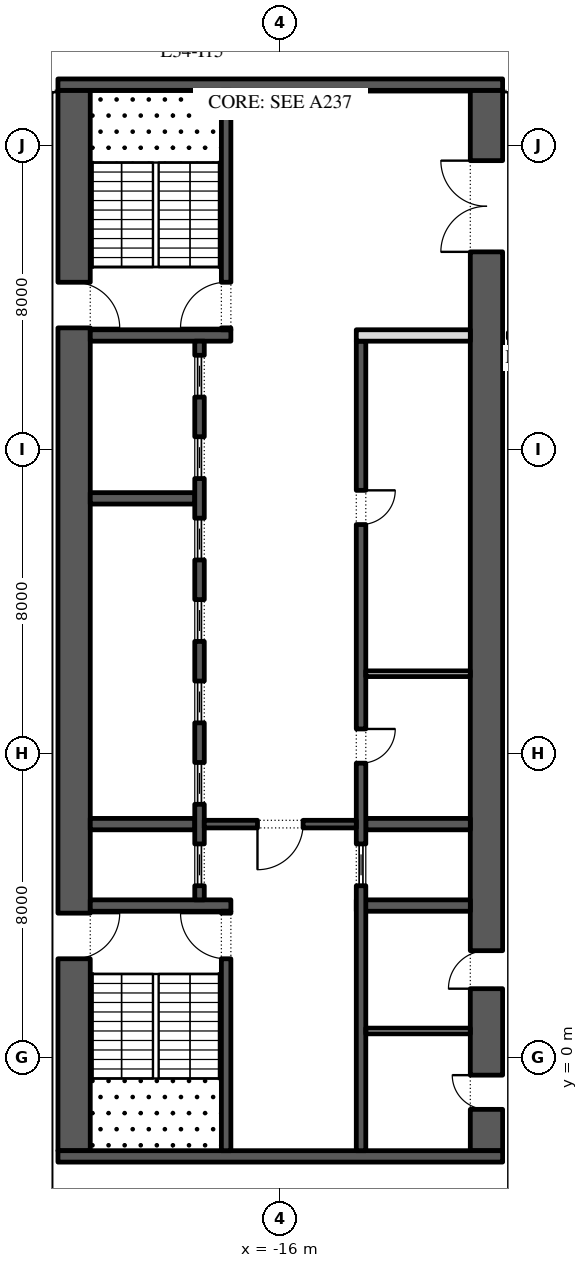
"""IFC4 building model, lengths in metres.
Left out: names, types, materials, properties, quantities, classifications, styles, units other than length and angle.
Written with IfcOpenShell. Run it as: python <this file> out.ifc"""

import sys

from ifc_helpers import new_model, si_unit, direction, frame, frame_2d, origin, place, context, subcontext, project, spatial, rectangle, extrude, element, fill, save


model = new_model("IFC4")
c1 = context("Model", 3, precision=1e-05, world=origin(), true_north=direction((0.0, 1.0)))
c2 = subcontext(c1, "Body", "Model", "MODEL_VIEW")
j1 = project(units=[si_unit("LENGTHUNIT", "METRE"), si_unit("PLANEANGLEUNIT", "RADIAN")], contexts=[c1])
p1 = place(None, origin())
s1 = spatial("IfcSite", under=j1, at=p1, CompositionType="ELEMENT")
p2 = place(p1, origin())
s2 = spatial("IfcBuilding", under=s1, at=p2, CompositionType="ELEMENT")
p3 = place(p2, frame((0.0, 0.0, 156.0)))
s3 = spatial("IfcBuildingStorey", under=s2, at=p3, CompositionType="ELEMENT", Elevation=156.0)
p4 = place(p3, frame((-21.425, -2.45, 0.0), z_axis=(0.0, 0.0, 1.0), x_axis=(0.0, 1.0, 0.0)))
e1 = element("IfcWall", 1, at=p4, inside=s3, PredefinedType="SHEAR", context=c2, shape_type="SweptSolid", body=[
    extrude(rectangle(XDim=27.9, YDim=0.85, at=frame_2d((13.95, 0.0))), origin(), (0.0, 0.0, 1.0), 3.9),
])
p5 = place(p4, frame((5.05, 0.0, 0.0)))
e2 = element("IfcOpeningElement", 2, at=p5, cuts=e1, PredefinedType="OPENING", context=c2, shape_type="SweptSolid", body=[
    extrude(rectangle(XDim=1.2, YDim=2.1, at=frame_2d((0.6, 1.05))), frame((0.0, 0.435, 0.0), z_axis=(0.0, -1.0, 0.0), x_axis=(1.0, 0.0, 0.0)), (0.0, 0.0, 1.0), 0.87),
])
p6 = place(p4, frame((21.65, 0.0, 0.0)))
e3 = element("IfcOpeningElement", 3, at=p6, cuts=e1, PredefinedType="OPENING", context=c2, shape_type="SweptSolid", body=[
    extrude(rectangle(XDim=1.2, YDim=2.1, at=frame_2d((0.6, 1.05))), frame((0.0, 0.435, 0.0), z_axis=(0.0, -1.0, 0.0), x_axis=(1.0, 0.0, 0.0)), (0.0, 0.0, 1.0), 0.87),
])
p7 = place(p3, frame((-10.575, -2.45, 0.0), z_axis=(0.0, 0.0, 1.0), x_axis=(0.0, 1.0, 0.0)))
e4 = element("IfcWall", 4, at=p7, inside=s3, PredefinedType="SHEAR", context=c2, shape_type="SweptSolid", body=[
    extrude(rectangle(XDim=27.9, YDim=0.85, at=frame_2d((13.95, 0.0))), origin(), (0.0, 0.0, 1.0), 3.9),
])
p8 = place(p7, frame((23.65, 0.0, 0.0)))
e5 = element("IfcOpeningElement", 5, at=p8, cuts=e4, PredefinedType="OPENING", context=c2, shape_type="SweptSolid", body=[
    extrude(rectangle(XDim=2.4, YDim=2.1, at=frame_2d((1.2, 1.05))), frame((0.0, 0.435, 0.0), z_axis=(0.0, -1.0, 0.0), x_axis=(1.0, 0.0, 0.0)), (0.0, 0.0, 1.0), 0.87),
])
p9 = place(p7, frame((1.087, 0.0, 0.0)))
e6 = element("IfcOpeningElement", 6, at=p9, cuts=e4, PredefinedType="OPENING", context=c2, shape_type="SweptSolid", body=[
    extrude(rectangle(XDim=0.9, YDim=2.1, at=frame_2d((0.45, 1.05))), frame((0.0, 0.435, 0.0), z_axis=(0.0, -1.0, 0.0), x_axis=(1.0, 0.0, 0.0)), (0.0, 0.0, 1.0), 0.87),
])
p10 = place(p7, frame((4.262, 0.0, 0.0)))
e7 = element("IfcOpeningElement", 7, at=p10, cuts=e4, PredefinedType="OPENING", context=c2, shape_type="SweptSolid", body=[
    extrude(rectangle(XDim=1.0, YDim=2.1, at=frame_2d((0.5, 1.05))), frame((0.0, 0.435, 0.0), z_axis=(0.0, -1.0, 0.0), x_axis=(1.0, 0.0, 0.0)), (0.0, 0.0, 1.0), 0.87),
])
for number, where, z_axis, x_axis in (
    (8, (-21.85, -2.6, 0.0), (0.0, 0.0, 1.0), (1.0, 0.0, 0.0)),
    (9, (-21.85, 25.6, 0.0), (0.0, 0.0, 1.0), (1.0, 0.0, 0.0)),
):
    element("IfcWall", number, at=place(p3, frame(where, z_axis=z_axis, x_axis=x_axis)), inside=s3, PredefinedType="SHEAR", context=c2, shape_type="SweptSolid", body=[
        extrude(rectangle(XDim=11.7, YDim=0.3, at=frame_2d((5.85, 0.0))), origin(), (0.0, 0.0, 1.0), 3.9),
    ])
p11 = place(p3, frame((-21.0, 4.0, 0.0), z_axis=(0.0, 0.0, 1.0), x_axis=(1.0, 0.0, 0.0)))
e10 = element("IfcWall", 10, at=p11, inside=s3, PredefinedType="SHEAR", context=c2, shape_type="SweptSolid", body=[
    extrude(rectangle(XDim=3.7, YDim=0.3, at=frame_2d((1.85, 0.0))), origin(), (0.0, 0.0, 1.0), 3.9),
])
p12 = place(p3, frame((-17.425, -2.45, 0.0), z_axis=(0.0, 0.0, 1.0), x_axis=(0.0, 1.0, 0.0)))
e11 = element("IfcWall", 11, at=p12, inside=s3, PredefinedType="SHEAR", context=c2, shape_type="SweptSolid", body=[
    extrude(rectangle(XDim=6.3, YDim=0.25, at=frame_2d((3.15, 0.0))), origin(), (0.0, 0.0, 1.0), 3.9),
])
p13 = place(p12, frame((5.05, 0.0, 0.0)))
e12 = element("IfcOpeningElement", 12, at=p13, cuts=e11, PredefinedType="OPENING", context=c2, shape_type="SweptSolid", body=[
    extrude(rectangle(XDim=1.2, YDim=2.1, at=frame_2d((0.6, 1.05))), frame((0.0, 0.135, 0.0), z_axis=(0.0, -1.0, 0.0), x_axis=(1.0, 0.0, 0.0)), (0.0, 0.0, 1.0), 0.27),
])
p14 = place(p3, frame((-21.0, 19.0, 0.0), z_axis=(0.0, 0.0, 1.0), x_axis=(1.0, 0.0, 0.0)))
e13 = element("IfcWall", 13, at=p14, inside=s3, PredefinedType="SHEAR", context=c2, shape_type="SweptSolid", body=[
    extrude(rectangle(XDim=3.7, YDim=0.3, at=frame_2d((1.85, 0.0))), origin(), (0.0, 0.0, 1.0), 3.9),
])
p15 = place(p3, frame((-17.425, 19.15, 0.0), z_axis=(0.0, 0.0, 1.0), x_axis=(0.0, 1.0, 0.0)))
e14 = element("IfcWall", 14, at=p15, inside=s3, PredefinedType="SHEAR", context=c2, shape_type="SweptSolid", body=[
    extrude(rectangle(XDim=6.3, YDim=0.25, at=frame_2d((3.15, 0.0))), origin(), (0.0, 0.0, 1.0), 3.9),
])
p16 = place(p15, frame((0.05, 0.0, 0.0)))
e15 = element("IfcOpeningElement", 15, at=p16, cuts=e14, PredefinedType="OPENING", context=c2, shape_type="SweptSolid", body=[
    extrude(rectangle(XDim=1.2, YDim=2.1, at=frame_2d((0.6, 1.05))), frame((0.0, 0.135, 0.0), z_axis=(0.0, -1.0, 0.0), x_axis=(1.0, 0.0, 0.0)), (0.0, 0.0, 1.0), 0.27),
])
for number, where, z_axis, x_axis in (
    (16, (-21.0, 6.143, 0.0), (0.0, 0.0, 1.0), (1.0, 0.0, 0.0)),
    (17, (-21.0, 14.714, 0.0), (0.0, 0.0, 1.0), (1.0, 0.0, 0.0)),
):
    element("IfcWall", number, at=place(p3, frame(where, z_axis=z_axis, x_axis=x_axis)), inside=s3, PredefinedType="SHEAR", context=c2, shape_type="SweptSolid", body=[
        extrude(rectangle(XDim=2.75, YDim=0.3, at=frame_2d((1.375, 0.0))), origin(), (0.0, 0.0, 1.0), 3.9),
    ])
p17 = place(p3, frame((-18.125, 4.15, 0.0), z_axis=(0.0, 0.0, 1.0), x_axis=(0.0, 1.0, 0.0)))
e18 = element("IfcWall", 18, at=p17, inside=s3, PredefinedType="SHEAR", context=c2, shape_type="SweptSolid", body=[
    extrude(rectangle(XDim=14.7, YDim=0.25, at=frame_2d((7.35, 0.0))), origin(), (0.0, 0.0, 1.0), 3.9),
])
p18 = place(p17, frame((0.371, 0.0, 0.0)))
e19 = element("IfcOpeningElement", 19, at=p18, cuts=e18, PredefinedType="OPENING", context=c2, shape_type="SweptSolid", body=[
    extrude(rectangle(XDim=1.1, YDim=2.1, at=frame_2d((0.55, 1.05))), frame((0.0, 0.135, 0.0), z_axis=(0.0, -1.0, 0.0), x_axis=(1.0, 0.0, 0.0)), (0.0, 0.0, 1.0), 0.27),
])
p19 = place(p17, frame((2.514, 0.0, 0.0)))
e20 = element("IfcOpeningElement", 20, at=p19, cuts=e18, PredefinedType="OPENING", context=c2, shape_type="SweptSolid", body=[
    extrude(rectangle(XDim=1.1, YDim=2.1, at=frame_2d((0.55, 1.05))), frame((0.0, 0.135, 0.0), z_axis=(0.0, -1.0, 0.0), x_axis=(1.0, 0.0, 0.0)), (0.0, 0.0, 1.0), 0.27),
])
p20 = place(p17, frame((4.657, 0.0, 0.0)))
e21 = element("IfcOpeningElement", 21, at=p20, cuts=e18, PredefinedType="OPENING", context=c2, shape_type="SweptSolid", body=[
    extrude(rectangle(XDim=1.1, YDim=2.1, at=frame_2d((0.55, 1.05))), frame((0.0, 0.135, 0.0), z_axis=(0.0, -1.0, 0.0), x_axis=(1.0, 0.0, 0.0)), (0.0, 0.0, 1.0), 0.27),
])
p21 = place(p17, frame((6.8, 0.0, 0.0)))
e22 = element("IfcOpeningElement", 22, at=p21, cuts=e18, PredefinedType="OPENING", context=c2, shape_type="SweptSolid", body=[
    extrude(rectangle(XDim=1.1, YDim=2.1, at=frame_2d((0.55, 1.05))), frame((0.0, 0.135, 0.0), z_axis=(0.0, -1.0, 0.0), x_axis=(1.0, 0.0, 0.0)), (0.0, 0.0, 1.0), 0.27),
])
p22 = place(p17, frame((8.943, 0.0, 0.0)))
e23 = element("IfcOpeningElement", 23, at=p22, cuts=e18, PredefinedType="OPENING", context=c2, shape_type="SweptSolid", body=[
    extrude(rectangle(XDim=1.1, YDim=2.1, at=frame_2d((0.55, 1.05))), frame((0.0, 0.135, 0.0), z_axis=(0.0, -1.0, 0.0), x_axis=(1.0, 0.0, 0.0)), (0.0, 0.0, 1.0), 0.27),
])
p23 = place(p17, frame((11.086, 0.0, 0.0)))
e24 = element("IfcOpeningElement", 24, at=p23, cuts=e18, PredefinedType="OPENING", context=c2, shape_type="SweptSolid", body=[
    extrude(rectangle(XDim=1.1, YDim=2.1, at=frame_2d((0.55, 1.05))), frame((0.0, 0.135, 0.0), z_axis=(0.0, -1.0, 0.0), x_axis=(1.0, 0.0, 0.0)), (0.0, 0.0, 1.0), 0.27),
])
p24 = place(p17, frame((13.229, 0.0, 0.0)))
e25 = element("IfcOpeningElement", 25, at=p24, cuts=e18, PredefinedType="OPENING", context=c2, shape_type="SweptSolid", body=[
    extrude(rectangle(XDim=1.1, YDim=2.1, at=frame_2d((0.55, 1.05))), frame((0.0, 0.135, 0.0), z_axis=(0.0, -1.0, 0.0), x_axis=(1.0, 0.0, 0.0)), (0.0, 0.0, 1.0), 0.27),
])
p25 = place(p3, frame((-14.0, 4.0, 0.0), z_axis=(0.0, 0.0, 1.0), x_axis=(1.0, 0.0, 0.0)))
e26 = element("IfcWall", 26, at=p25, inside=s3, PredefinedType="SHEAR", context=c2, shape_type="SweptSolid", body=[
    extrude(rectangle(XDim=3.0, YDim=0.3, at=frame_2d((1.5, 0.0))), origin(), (0.0, 0.0, 1.0), 3.9),
])
p26 = place(p3, frame((-13.75, 6.143, 0.0), z_axis=(0.0, 0.0, 1.0), x_axis=(1.0, 0.0, 0.0)))
e27 = element("IfcWall", 27, at=p26, inside=s3, PredefinedType="SHEAR", context=c2, shape_type="SweptSolid", body=[
    extrude(rectangle(XDim=2.75, YDim=0.3, at=frame_2d((1.375, 0.0))), origin(), (0.0, 0.0, 1.0), 3.9),
])
p27 = place(p3, frame((-13.875, -2.45, 0.0), z_axis=(0.0, 0.0, 1.0), x_axis=(0.0, 1.0, 0.0)))
e28 = element("IfcWall", 28, at=p27, inside=s3, PredefinedType="SHEAR", context=c2, shape_type="SweptSolid", body=[
    extrude(rectangle(XDim=21.3, YDim=0.25, at=frame_2d((10.65, 0.0))), origin(), (0.0, 0.0, 1.0), 3.9),
])
p28 = place(p27, frame((10.196, 0.0, 0.0)))
e29 = element("IfcOpeningElement", 29, at=p28, cuts=e28, PredefinedType="OPENING", context=c2, shape_type="SweptSolid", body=[
    extrude(rectangle(XDim=0.9, YDim=2.1, at=frame_2d((0.45, 1.05))), frame((0.0, 0.135, 0.0), z_axis=(0.0, -1.0, 0.0), x_axis=(1.0, 0.0, 0.0)), (0.0, 0.0, 1.0), 0.27),
])
p29 = place(p27, frame((16.475, 0.0, 0.0)))
e30 = element("IfcOpeningElement", 30, at=p29, cuts=e28, PredefinedType="OPENING", context=c2, shape_type="SweptSolid", body=[
    extrude(rectangle(XDim=0.9, YDim=2.1, at=frame_2d((0.45, 1.05))), frame((0.0, 0.135, 0.0), z_axis=(0.0, -1.0, 0.0), x_axis=(1.0, 0.0, 0.0)), (0.0, 0.0, 1.0), 0.27),
])
p30 = place(p27, frame((6.971, 0.0, 0.0)))
e31 = element("IfcOpeningElement", 31, at=p30, cuts=e28, PredefinedType="OPENING", context=c2, shape_type="SweptSolid", body=[
    extrude(rectangle(XDim=1.1, YDim=2.1, at=frame_2d((0.55, 1.05))), frame((0.0, 0.135, 0.0), z_axis=(0.0, -1.0, 0.0), x_axis=(1.0, 0.0, 0.0)), (0.0, 0.0, 1.0), 0.27),
])
p31 = place(p3, frame((-14.0, 19.0, 0.0), z_axis=(0.0, 0.0, 1.0), x_axis=(1.0, 0.0, 0.0)))
e32 = element("IfcWall", 32, at=p31, inside=s3, PredefinedType="PARTITIONING", context=c2, shape_type="SweptSolid", body=[
    extrude(rectangle(XDim=3.0, YDim=0.3, at=frame_2d((1.5, 0.0))), origin(), (0.0, 0.0, 1.0), 3.9),
])
p32 = place(p3, frame((-13.75, 10.1, 0.0), z_axis=(0.0, 0.0, 1.0), x_axis=(1.0, 0.0, 0.0)))
e33 = element("IfcWall", 33, at=p32, inside=s3, PredefinedType="PARTITIONING", context=c2, shape_type="SweptSolid", body=[
    extrude(rectangle(XDim=2.75, YDim=0.15, at=frame_2d((1.375, 0.0))), origin(), (0.0, 0.0, 1.0), 3.9),
])
p33 = place(p3, frame((-18.0, 6.143, 0.0), z_axis=(0.0, 0.0, 1.0), x_axis=(1.0, 0.0, 0.0)))
e34 = element("IfcWall", 34, at=p33, inside=s3, PredefinedType="SHEAR", context=c2, shape_type="SweptSolid", body=[
    extrude(rectangle(XDim=4.0, YDim=0.2, at=frame_2d((2.0, 0.0))), origin(), (0.0, 0.0, 1.0), 3.9),
])
p34 = place(p33, frame((1.4, 0.0, 0.0)))
e35 = element("IfcOpeningElement", 35, at=p34, cuts=e34, PredefinedType="OPENING", context=c2, shape_type="SweptSolid", body=[
    extrude(rectangle(XDim=1.2, YDim=2.1, at=frame_2d((0.6, 1.05))), frame((0.0, 0.11, 0.0), z_axis=(0.0, -1.0, 0.0), x_axis=(1.0, 0.0, 0.0)), (0.0, 0.0, 1.0), 0.22),
])
p35 = place(p3, frame((-13.75, 0.7, 0.0), z_axis=(0.0, 0.0, 1.0), x_axis=(1.0, 0.0, 0.0)))
e36 = element("IfcWall", 36, at=p35, inside=s3, PredefinedType="PARTITIONING", context=c2, shape_type="SweptSolid", body=[
    extrude(rectangle(XDim=2.75, YDim=0.15, at=frame_2d((1.375, 0.0))), origin(), (0.0, 0.0, 1.0), 3.9),
])
p36 = place(p3, frame((-10.0, 19.0, 0.0), z_axis=(0.0, 0.0, 1.0), x_axis=(1.0, 0.0, 0.0)))
e37 = element("IfcWall", 37, at=p36, inside=s3, PredefinedType="PARTITIONING", context=c2, shape_type="SweptSolid", body=[
    extrude(rectangle(XDim=1.515, YDim=0.15, at=frame_2d((0.757, 0.0))), origin(), (0.0, 0.0, 1.0), 3.9),
])
p37 = place(p36, frame((0.258, 0.0, 0.0)))
e38 = element("IfcOpeningElement", 38, at=p37, cuts=e37, PredefinedType="OPENING", context=c2, shape_type="SweptSolid", body=[
    extrude(rectangle(XDim=1.0, YDim=2.1, at=frame_2d((0.5, 1.05))), frame((0.0, 0.085, 0.0), z_axis=(0.0, -1.0, 0.0), x_axis=(1.0, 0.0, 0.0)), (0.0, 0.0, 1.0), 0.17),
])
p38 = place(p18, origin())
e39 = element("IfcDoor", 39, at=p38, inside=s3, OperationType="SLIDING_TO_LEFT", PredefinedType="DOOR", context=c2, shape_type="SweptSolid", body=[
    extrude(rectangle(XDim=1.1, YDim=2.1, at=frame_2d((0.55, 1.05))), frame((0.0, 0.025, 0.0), z_axis=(0.0, -1.0, 0.0), x_axis=(1.0, 0.0, 0.0)), (0.0, 0.0, 1.0), 0.05),
])
fill(e19, e39)
p39 = place(p19, origin())
e40 = element("IfcDoor", 40, at=p39, inside=s3, OperationType="SLIDING_TO_LEFT", PredefinedType="DOOR", context=c2, shape_type="SweptSolid", body=[
    extrude(rectangle(XDim=1.1, YDim=2.1, at=frame_2d((0.55, 1.05))), frame((0.0, 0.025, 0.0), z_axis=(0.0, -1.0, 0.0), x_axis=(1.0, 0.0, 0.0)), (0.0, 0.0, 1.0), 0.05),
])
fill(e20, e40)
p40 = place(p20, origin())
e41 = element("IfcDoor", 41, at=p40, inside=s3, OperationType="SLIDING_TO_LEFT", PredefinedType="DOOR", context=c2, shape_type="SweptSolid", body=[
    extrude(rectangle(XDim=1.1, YDim=2.1, at=frame_2d((0.55, 1.05))), frame((0.0, 0.025, 0.0), z_axis=(0.0, -1.0, 0.0), x_axis=(1.0, 0.0, 0.0)), (0.0, 0.0, 1.0), 0.05),
])
fill(e21, e41)
p41 = place(p21, origin())
e42 = element("IfcDoor", 42, at=p41, inside=s3, OperationType="SLIDING_TO_LEFT", PredefinedType="DOOR", context=c2, shape_type="SweptSolid", body=[
    extrude(rectangle(XDim=1.1, YDim=2.1, at=frame_2d((0.55, 1.05))), frame((0.0, 0.025, 0.0), z_axis=(0.0, -1.0, 0.0), x_axis=(1.0, 0.0, 0.0)), (0.0, 0.0, 1.0), 0.05),
])
fill(e22, e42)
p42 = place(p22, origin())
e43 = element("IfcDoor", 43, at=p42, inside=s3, OperationType="SLIDING_TO_LEFT", PredefinedType="DOOR", context=c2, shape_type="SweptSolid", body=[
    extrude(rectangle(XDim=1.1, YDim=2.1, at=frame_2d((0.55, 1.05))), frame((0.0, 0.025, 0.0), z_axis=(0.0, -1.0, 0.0), x_axis=(1.0, 0.0, 0.0)), (0.0, 0.0, 1.0), 0.05),
])
fill(e23, e43)
p43 = place(p23, origin())
e44 = element("IfcDoor", 44, at=p43, inside=s3, OperationType="SLIDING_TO_LEFT", PredefinedType="DOOR", context=c2, shape_type="SweptSolid", body=[
    extrude(rectangle(XDim=1.1, YDim=2.1, at=frame_2d((0.55, 1.05))), frame((0.0, 0.025, 0.0), z_axis=(0.0, -1.0, 0.0), x_axis=(1.0, 0.0, 0.0)), (0.0, 0.0, 1.0), 0.05),
])
fill(e24, e44)
p44 = place(p24, origin())
e45 = element("IfcDoor", 45, at=p44, inside=s3, OperationType="SLIDING_TO_LEFT", PredefinedType="DOOR", context=c2, shape_type="SweptSolid", body=[
    extrude(rectangle(XDim=1.1, YDim=2.1, at=frame_2d((0.55, 1.05))), frame((0.0, 0.025, 0.0), z_axis=(0.0, -1.0, 0.0), x_axis=(1.0, 0.0, 0.0)), (0.0, 0.0, 1.0), 0.05),
])
fill(e25, e45)
p45 = place(p28, frame((0.9, -0.2, 0.0), z_axis=(0.0, 0.0, 1.0), x_axis=(-1.0, 0.0, 0.0)))
e46 = element("IfcDoor", 46, at=p45, inside=s3, OperationType="SINGLE_SWING_RIGHT", PredefinedType="DOOR", context=c2, shape_type="SweptSolid", body=[
    extrude(rectangle(XDim=0.9, YDim=2.1, at=frame_2d((0.45, 1.05))), frame((0.0, -0.075, 0.0), z_axis=(0.0, -1.0, 0.0), x_axis=(1.0, 0.0, 0.0)), (0.0, 0.0, 1.0), 0.05),
])
fill(e29, e46)
p46 = place(p29, frame((0.9, -0.2, 0.0), z_axis=(0.0, 0.0, 1.0), x_axis=(-1.0, 0.0, 0.0)))
e47 = element("IfcDoor", 47, at=p46, inside=s3, OperationType="SINGLE_SWING_RIGHT", PredefinedType="DOOR", context=c2, shape_type="SweptSolid", body=[
    extrude(rectangle(XDim=0.9, YDim=2.1, at=frame_2d((0.45, 1.05))), frame((0.0, -0.075, 0.0), z_axis=(0.0, -1.0, 0.0), x_axis=(1.0, 0.0, 0.0)), (0.0, 0.0, 1.0), 0.05),
])
fill(e30, e47)
p47 = place(p30, origin())
e48 = element("IfcDoor", 48, at=p47, inside=s3, OperationType="SLIDING_TO_LEFT", PredefinedType="DOOR", context=c2, shape_type="SweptSolid", body=[
    extrude(rectangle(XDim=1.1, YDim=2.1, at=frame_2d((0.55, 1.05))), frame((0.0, 0.025, 0.0), z_axis=(0.0, -1.0, 0.0), x_axis=(1.0, 0.0, 0.0)), (0.0, 0.0, 1.0), 0.05),
])
fill(e31, e48)
p48 = place(p34, frame((1.2, 0.0, 0.0), z_axis=(0.0, 0.0, 1.0), x_axis=(-1.0, 0.0, 0.0)))
e49 = element("IfcDoor", 49, at=p48, inside=s3, OperationType="SINGLE_SWING_LEFT", PredefinedType="DOOR", context=c2, shape_type="SweptSolid", body=[
    extrude(rectangle(XDim=1.2, YDim=2.1, at=frame_2d((0.6, 1.05))), frame((0.0, 0.025, 0.0), z_axis=(0.0, -1.0, 0.0), x_axis=(1.0, 0.0, 0.0)), (0.0, 0.0, 1.0), 0.05),
])
fill(e35, e49)
p49 = place(p8, origin())
e50 = element("IfcDoor", 50, at=p49, inside=s3, OperationType="DOUBLE_DOOR_SINGLE_SWING", PredefinedType="DOOR", context=c2, shape_type="SweptSolid", body=[
    extrude(rectangle(XDim=2.4, YDim=2.1, at=frame_2d((1.2, 1.05))), frame((0.0, 0.025, 0.0), z_axis=(0.0, -1.0, 0.0), x_axis=(1.0, 0.0, 0.0)), (0.0, 0.0, 1.0), 0.05),
])
fill(e5, e50)
p50 = place(p13, origin())
e51 = element("IfcDoor", 51, at=p50, inside=s3, OperationType="SINGLE_SWING_LEFT", PredefinedType="DOOR", context=c2, shape_type="SweptSolid", body=[
    extrude(rectangle(XDim=1.2, YDim=2.1, at=frame_2d((0.6, 1.05))), frame((0.0, 0.025, 0.0), z_axis=(0.0, -1.0, 0.0), x_axis=(1.0, 0.0, 0.0)), (0.0, 0.0, 1.0), 0.05),
])
fill(e12, e51)
p51 = place(p5, frame((1.2, 0.0, 0.0), z_axis=(0.0, 0.0, 1.0), x_axis=(-1.0, 0.0, 0.0)))
e52 = element("IfcDoor", 52, at=p51, inside=s3, OperationType="SINGLE_SWING_RIGHT", PredefinedType="DOOR", context=c2, shape_type="SweptSolid", body=[
    extrude(rectangle(XDim=1.2, YDim=2.1, at=frame_2d((0.6, 1.05))), frame((0.0, 0.025, 0.0), z_axis=(0.0, -1.0, 0.0), x_axis=(1.0, 0.0, 0.0)), (0.0, 0.0, 1.0), 0.05),
])
fill(e2, e52)
p52 = place(p16, origin())
e53 = element("IfcDoor", 53, at=p52, inside=s3, OperationType="SINGLE_SWING_RIGHT", PredefinedType="DOOR", context=c2, shape_type="SweptSolid", body=[
    extrude(rectangle(XDim=1.2, YDim=2.1, at=frame_2d((0.6, 1.05))), frame((0.0, 0.025, 0.0), z_axis=(0.0, -1.0, 0.0), x_axis=(1.0, 0.0, 0.0)), (0.0, 0.0, 1.0), 0.05),
])
fill(e15, e53)
p53 = place(p6, frame((1.2, 0.0, 0.0), z_axis=(0.0, 0.0, 1.0), x_axis=(-1.0, 0.0, 0.0)))
e54 = element("IfcDoor", 54, at=p53, inside=s3, OperationType="SINGLE_SWING_LEFT", PredefinedType="DOOR", context=c2, shape_type="SweptSolid", body=[
    extrude(rectangle(XDim=1.2, YDim=2.1, at=frame_2d((0.6, 1.05))), frame((0.0, 0.025, 0.0), z_axis=(0.0, -1.0, 0.0), x_axis=(1.0, 0.0, 0.0)), (0.0, 0.0, 1.0), 0.05),
])
fill(e3, e54)
p54 = place(p9, origin())
e55 = element("IfcDoor", 55, at=p54, inside=s3, OperationType="SINGLE_SWING_LEFT", PredefinedType="DOOR", context=c2, shape_type="SweptSolid", body=[
    extrude(rectangle(XDim=0.9, YDim=2.1, at=frame_2d((0.45, 1.05))), frame((0.0, 0.425, 0.0), z_axis=(0.0, -1.0, 0.0), x_axis=(1.0, 0.0, 0.0)), (0.0, 0.0, 1.0), 0.05),
])
fill(e6, e55)
p55 = place(p10, origin())
e56 = element("IfcDoor", 56, at=p55, inside=s3, OperationType="SINGLE_SWING_RIGHT", PredefinedType="DOOR", context=c2, shape_type="SweptSolid", body=[
    extrude(rectangle(XDim=1.0, YDim=2.1, at=frame_2d((0.5, 1.05))), frame((0.0, 0.425, 0.0), z_axis=(0.0, -1.0, 0.0), x_axis=(1.0, 0.0, 0.0)), (0.0, 0.0, 1.0), 0.05),
])
fill(e7, e56)
save(model, sys.argv[1])
